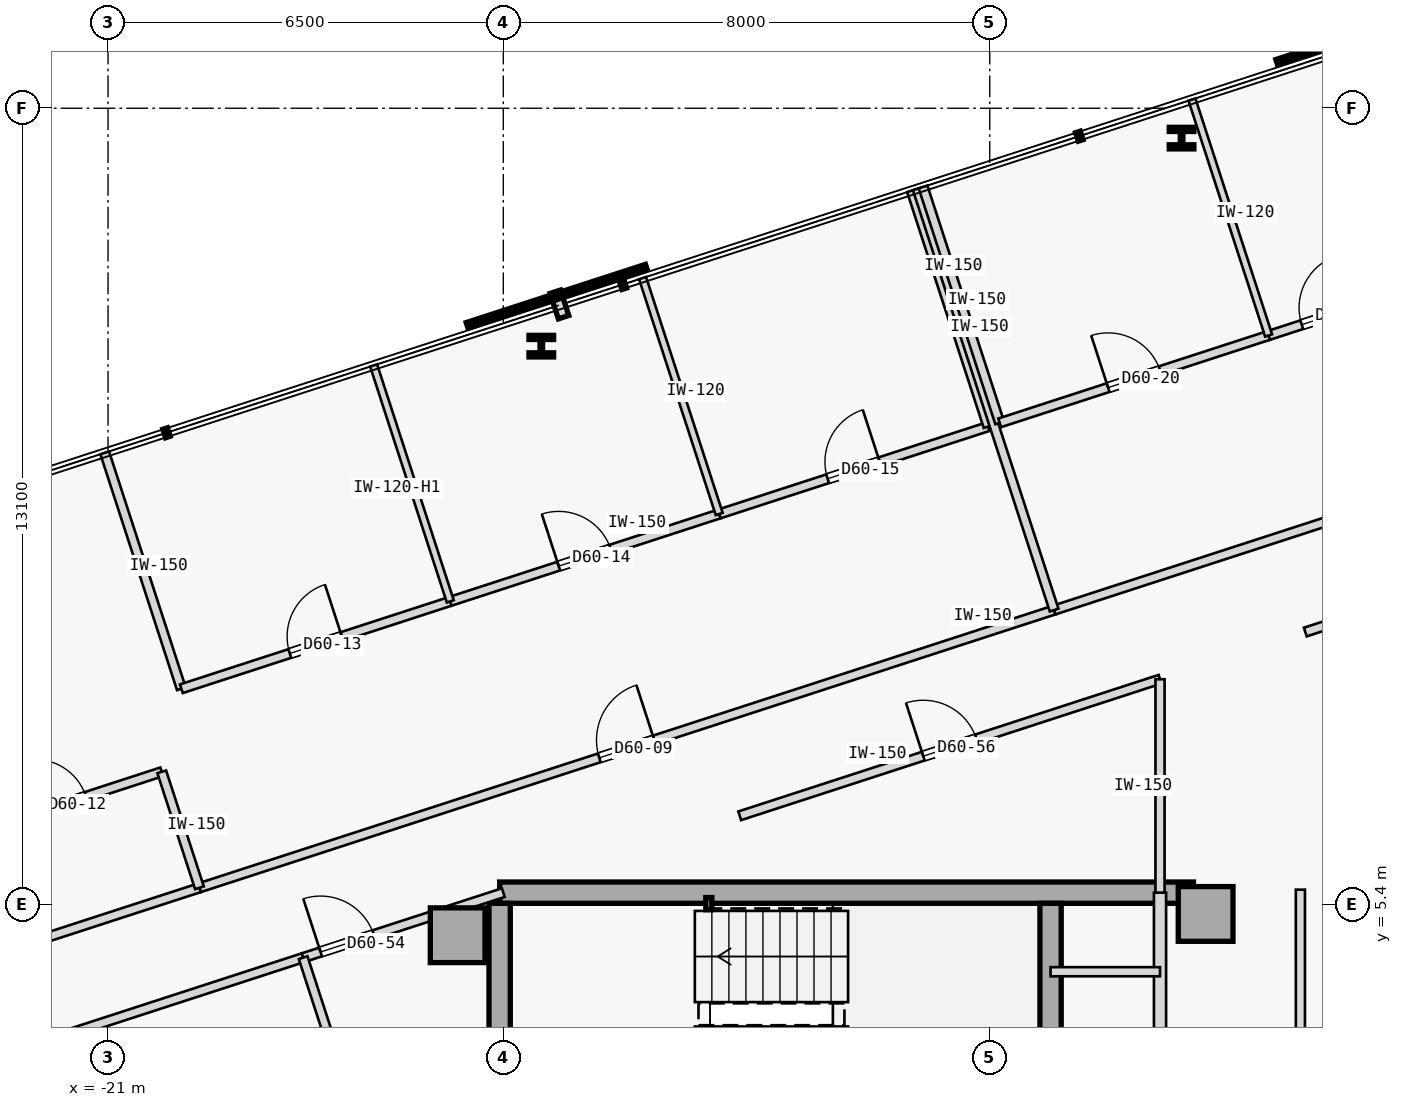
"""IFC4 building model, lengths in metres.
Left out: names, types, materials, properties, quantities, classifications, styles, units other than length and angle.
Written with IfcOpenShell. Run it as: python <this file> out.ifc"""

import sys

from ifc_helpers import new_model, si_unit, direction, frame, frame_2d, origin, origin_2d, place, context, subcontext, project, spatial, rectangle, hollow_rectangle, i_section, extrude, element, fill, save


model = new_model("IFC4")
c1 = context("Model", 3, precision=1e-05, world=origin(), true_north=direction((0.0, 1.0)))
c2 = subcontext(c1, "Body", "Model", "MODEL_VIEW")
j1 = project(units=[si_unit("LENGTHUNIT", "METRE"), si_unit("PLANEANGLEUNIT", "RADIAN")], contexts=[c1])
p1 = place(None, origin())
s1 = spatial("IfcSite", under=j1, at=p1, CompositionType="ELEMENT")
p2 = place(p1, origin())
s2 = spatial("IfcBuilding", under=s1, at=p2, CompositionType="ELEMENT")
p3 = place(p2, frame((0.0, 0.0, 227.65)))
s3 = spatial("IfcBuildingStorey", under=s2, at=p3, CompositionType="ELEMENT", Elevation=227.65)
for number, where, z_axis, x_axis in (
    (1, (-15.25, 4.9, 0.0), (0.0, 0.0, 1.0), (1.0, 0.0, 0.0)),
    (2, (-2.95, 5.25, 0.0), (0.0, 0.0, 1.0), (1.0, 0.0, 0.0)),
):
    element("IfcColumn", number, at=place(p3, frame(where, z_axis=z_axis, x_axis=x_axis)), inside=s3, PredefinedType="COLUMN", context=c2, shape_type="SweptSolid", body=[
        extrude(rectangle(XDim=0.9, YDim=0.9, at=origin_2d()), origin(), (0.0, 0.0, 1.0), 3.35),
    ])
p4 = place(p3, frame((-14.56, 5.6, 0.0), z_axis=(0.0, 0.0, 1.0), x_axis=(1.0, 0.0, 0.0)))
e3 = element("IfcWall", 3, at=p4, inside=s3, PredefinedType="SHEAR", context=c2, shape_type="SweptSolid", body=[
    extrude(rectangle(XDim=11.41, YDim=0.35, at=frame_2d((5.705, 0.0))), origin(), (0.0, 0.0, 1.0), 3.125),
])
p5 = place(p3, frame((-14.56, -5.425, 0.0), z_axis=(0.0, 0.0, 1.0), x_axis=(0.0, 1.0, 0.0)))
e4 = element("IfcWall", 4, at=p5, inside=s3, PredefinedType="SHEAR", context=c2, shape_type="SweptSolid", body=[
    extrude(rectangle(XDim=10.85, YDim=0.35, at=frame_2d((5.425, 0.0))), origin(), (0.0, 0.0, 1.0), 3.125),
])
p6 = place(p3, frame((-5.5, 2.15, 0.0), z_axis=(0.0, 0.0, 1.0), x_axis=(0.0, 1.0, 0.0)))
e5 = element("IfcWall", 5, at=p6, inside=s3, PredefinedType="SHEAR", context=c2, shape_type="SweptSolid", body=[
    extrude(rectangle(XDim=3.275, YDim=0.35, at=frame_2d((1.638, 0.0))), origin(), (0.0, 0.0, 1.0), 3.125),
])
p7 = place(p3, frame((-11.12, 5.42, 0.0), z_axis=(0.0, 0.0, 1.0), x_axis=(1.0, 0.0, 0.0)))
e6 = element("IfcColumn", 6, at=p7, inside=s3, PredefinedType="COLUMN", context=c2, shape_type="SweptSolid", body=[
    extrude(hollow_rectangle(XDim=0.1, YDim=0.2, WallThickness=0.008, at=origin_2d()), origin(), (0.0, 0.0, 1.0), 3.35),
])
for number, where, z_axis, x_axis in (
    (7, (-3.346, 18.009, 0.0), (0.0, 0.0, 1.0), (1.0, 0.0, 0.0)),
    (8, (-13.875, 14.587, 0.0), (0.0, 0.0, 1.0), (1.0, 0.0, 0.0)),
):
    element("IfcColumn", number, at=place(p3, frame(where, z_axis=z_axis, x_axis=x_axis)), inside=s3, PredefinedType="COLUMN", context=c2, shape_type="SweptSolid", body=[
        extrude(i_section(OverallWidth=0.405, OverallDepth=0.355, WebThickness=0.042, FlangeThickness=0.068, FilletRadius=0.015, at=origin_2d()), origin(), (0.0, 0.0, 1.0), 3.35),
    ])
p8 = place(p3, frame((-3.7, -1.15, 0.0), z_axis=(0.0, 0.0, 1.0), x_axis=(0.0, 1.0, 0.0)))
e9 = element("IfcWall", 9, at=p8, inside=s3, PredefinedType="STANDARD", context=c2, shape_type="SweptSolid", body=[
    extrude(rectangle(XDim=6.75, YDim=0.2, at=frame_2d((3.375, 0.0))), origin(), (0.0, 0.0, 1.0), 3.125),
])
p9 = place(p8, frame((3.6, 0.0, 0.0)))
e10 = element("IfcOpeningElement", 10, at=p9, cuts=e9, PredefinedType="OPENING", context=c2, shape_type="SweptSolid", body=[
    extrude(rectangle(XDim=0.92, YDim=2.15, at=frame_2d((0.46, 1.075))), frame((0.0, 0.11, 0.0), z_axis=(0.0, -1.0, 0.0), x_axis=(1.0, 0.0, 0.0)), (0.0, 0.0, 1.0), 0.22),
])
p10 = place(p3, frame((-5.5, 4.3, 0.0), z_axis=(0.0, 0.0, 1.0), x_axis=(1.0, 0.0, 0.0)))
e11 = element("IfcWall", 11, at=p10, inside=s3, PredefinedType="PARTITIONING", context=c2, shape_type="SweptSolid", body=[
    extrude(rectangle(XDim=1.8, YDim=0.15, at=frame_2d((0.9, 0.0))), origin(), (0.0, 0.0, 1.0), 3.125),
])
p11 = place(p3, frame((-1.391, -5.65, 0.0), z_axis=(0.0, 0.0, 1.0), x_axis=(-8.6422954e-05, 0.999999996266, 0.0)))
e12 = element("IfcWall", 12, at=p11, inside=s3, PredefinedType="PARTITIONING", context=c2, shape_type="SweptSolid", body=[
    extrude(rectangle(XDim=11.3, YDim=0.15, at=frame_2d((5.65, 0.0))), origin(), (0.0, 0.0, 1.0), 3.125),
])
p12 = place(p11, frame((5.175, 0.0, 0.0)))
e13 = element("IfcOpeningElement", 13, at=p12, cuts=e12, PredefinedType="OPENING", context=c2, shape_type="SweptSolid", body=[
    extrude(rectangle(XDim=0.95, YDim=2.15, at=frame_2d((0.475, 1.075))), frame((0.0, 0.085, 0.0), z_axis=(0.0, -1.0, 0.0), x_axis=(1.0, 0.0, 0.0)), (0.0, 0.0, 1.0), 0.17),
])
p13 = place(p3, frame((-19.497, 5.68, 0.0), z_axis=(0.0, 0.0, 1.0), x_axis=(0.95105300492, 0.309027801067, 0.0)))
e14 = element("IfcWall", 14, at=p13, inside=s3, PredefinedType="PARTITIONING", context=c2, shape_type="SweptSolid", body=[
    extrude(rectangle(XDim=14.779, YDim=0.15, at=frame_2d((7.39, 0.0))), origin(), (0.0, 0.0, 1.0), 3.125),
])
p14 = place(p13, frame((6.915, 0.0, 0.0)))
e15 = element("IfcOpeningElement", 15, at=p14, cuts=e14, PredefinedType="OPENING", context=c2, shape_type="SweptSolid", body=[
    extrude(rectangle(XDim=0.95, YDim=2.15, at=frame_2d((0.475, 1.075))), frame((0.0, 0.085, 0.0), z_axis=(0.0, -1.0, 0.0), x_axis=(1.0, 0.0, 0.0)), (0.0, 0.0, 1.0), 0.17),
])
p15 = place(p3, frame((-22.826, 4.599, 0.0), z_axis=(0.0, 0.0, 1.0), x_axis=(0.951055596592, 0.309019824916, 0.0)))
e16 = element("IfcWall", 16, at=p15, inside=s3, PredefinedType="PARTITIONING", context=c2, shape_type="SweptSolid", body=[
    extrude(rectangle(XDim=3.5, YDim=0.15, at=frame_2d((1.75, 0.0))), origin(), (0.0, 0.0, 1.0), 3.125),
])
p16 = place(p3, frame((-5.441, 10.247, 0.0), z_axis=(0.0, 0.0, 1.0), x_axis=(0.951062860421, 0.308997468483, 0.0)))
e17 = element("IfcWall", 17, at=p16, inside=s3, PredefinedType="PARTITIONING", context=c2, shape_type="SweptSolid", body=[
    extrude(rectangle(XDim=6.542, YDim=0.15, at=frame_2d((3.271, 0.0))), origin(), (0.0, 0.0, 1.0), 3.125),
])
p17 = place(p3, frame((-33.633, -0.616, 0.0), z_axis=(0.0, 0.0, 1.0), x_axis=(0.951058192995, 0.309011833974, 0.0)))
e18 = element("IfcWall", 18, at=p17, inside=s3, PredefinedType="PARTITIONING", context=c2, shape_type="SweptSolid", body=[
    extrude(rectangle(XDim=16.657, YDim=0.15, at=frame_2d((8.329, 0.0))), origin(), (0.0, 0.0, 1.0), 3.125),
])
p18 = place(p17, frame((7.868, 0.0, 0.0)))
e19 = element("IfcOpeningElement", 19, at=p18, cuts=e18, PredefinedType="OPENING", context=c2, shape_type="SweptSolid", body=[
    extrude(rectangle(XDim=0.92, YDim=2.15, at=frame_2d((0.46, 1.075))), frame((0.0, 0.085, 0.0), z_axis=(0.0, -1.0, 0.0), x_axis=(1.0, 0.0, 0.0)), (0.0, 0.0, 1.0), 0.17),
])
p19 = place(p3, frame((-17.792, 4.531, 0.0), z_axis=(0.0, 0.0, 1.0), x_axis=(0.951047546178, 0.309044600193, 0.0)))
e20 = element("IfcWall", 20, at=p19, inside=s3, PredefinedType="PARTITIONING", context=c2, shape_type="SweptSolid", body=[
    extrude(rectangle(XDim=3.461, YDim=0.15, at=frame_2d((1.73, 0.0))), origin(), (0.0, 0.0, 1.0), 3.125),
])
p20 = place(p19, frame((0.302, 0.0, 0.0)))
e21 = element("IfcOpeningElement", 21, at=p20, cuts=e20, PredefinedType="OPENING", context=c2, shape_type="SweptSolid", body=[
    extrude(rectangle(XDim=0.92, YDim=2.15, at=frame_2d((0.46, 1.075))), frame((0.0, 0.085, 0.0), z_axis=(0.0, -1.0, 0.0), x_axis=(1.0, 0.0, 0.0)), (0.0, 0.0, 1.0), 0.17),
])
p21 = place(p3, frame((-1.311, 9.886, 0.0), z_axis=(0.0, 0.0, 1.0), x_axis=(0.951068803905, 0.308979174442, 0.0)))
e22 = element("IfcWall", 22, at=p21, inside=s3, PredefinedType="PARTITIONING", context=c2, shape_type="SweptSolid", body=[
    extrude(rectangle(XDim=3.46, YDim=0.15, at=frame_2d((1.73, 0.0))), origin(), (0.0, 0.0, 1.0), 3.125),
])
p22 = place(p3, frame((-10.612, 6.864, 0.0), z_axis=(0.0, 0.0, 1.0), x_axis=(0.951060972078, 0.309003280548, 0.0)))
e23 = element("IfcWall", 23, at=p22, inside=s3, PredefinedType="PARTITIONING", context=c2, shape_type="SweptSolid", body=[
    extrude(rectangle(XDim=7.268, YDim=0.15, at=frame_2d((3.634, 0.0))), origin(), (0.0, 0.0, 1.0), 3.125),
])
p23 = place(p22, frame((3.174, 0.0, 0.0)))
e24 = element("IfcOpeningElement", 24, at=p23, cuts=e23, PredefinedType="OPENING", context=c2, shape_type="SweptSolid", body=[
    extrude(rectangle(XDim=0.92, YDim=2.15, at=frame_2d((0.46, 1.075))), frame((0.0, 0.085, 0.0), z_axis=(0.0, -1.0, 0.0), x_axis=(1.0, 0.0, 0.0)), (0.0, 0.0, 1.0), 0.17),
])
p24 = place(p3, frame((-3.7, 5.6, 0.0), z_axis=(0.0, 0.0, 1.0), x_axis=(0.000139120755, 0.999999990323, 0.0)))
e25 = element("IfcWall", 25, at=p24, inside=s3, PredefinedType="PARTITIONING", context=c2, shape_type="SweptSolid", body=[
    extrude(rectangle(XDim=3.51, YDim=0.15, at=frame_2d((1.755, 0.0))), origin(), (0.0, 0.0, 1.0), 3.125),
])
p25 = place(p3, frame((-23.445, 6.506, 0.0), z_axis=(0.0, 0.0, 1.0), x_axis=(0.951055596592, 0.309019824916, 0.0)))
e26 = element("IfcWall", 26, at=p25, inside=s3, PredefinedType="PARTITIONING", context=c2, shape_type="SweptSolid", body=[
    extrude(rectangle(XDim=3.5, YDim=0.15, at=frame_2d((1.75, 0.0))), origin(), (0.0, 0.0, 1.0), 3.125),
])
p26 = place(p25, frame((1.31, 0.0, 0.0)))
e27 = element("IfcOpeningElement", 27, at=p26, cuts=e26, PredefinedType="OPENING", context=c2, shape_type="SweptSolid", body=[
    extrude(rectangle(XDim=0.88, YDim=2.15, at=frame_2d((0.44, 1.075))), frame((0.0, 0.085, 0.0), z_axis=(0.0, -1.0, 0.0), x_axis=(1.0, 0.0, 0.0)), (0.0, 0.0, 1.0), 0.17),
])
p27 = place(p3, frame((-19.497, 5.68, 0.0), z_axis=(0.0, 0.0, 1.0), x_axis=(-0.309022749039, 0.951054646472, 0.0)))
e28 = element("IfcWall", 28, at=p27, inside=s3, PredefinedType="PARTITIONING", context=c2, shape_type="SweptSolid", body=[
    extrude(rectangle(XDim=2.005, YDim=0.15, at=frame_2d((1.002, 0.0))), origin(), (0.0, 0.0, 1.0), 3.125),
])
p28 = place(p3, frame((-19.794, 8.954, 0.0), z_axis=(0.0, 0.0, 1.0), x_axis=(-0.309018403393, 0.951056058476, 0.0)))
e29 = element("IfcWall", 29, at=p28, inside=s3, PredefinedType="PARTITIONING", context=c2, shape_type="SweptSolid", body=[
    extrude(rectangle(XDim=4.079, YDim=0.15, at=frame_2d((2.04, 0.0))), origin(), (0.0, 0.0, 1.0), 3.125),
])
p29 = place(p3, frame((-19.794, 8.954, 0.0), z_axis=(0.0, 0.0, 1.0), x_axis=(0.951065702951, 0.308988719326, 0.0)))
e30 = element("IfcWall", 30, at=p29, inside=s3, PredefinedType="PARTITIONING", context=c2, shape_type="SweptSolid", body=[
    extrude(rectangle(XDim=4.65, YDim=0.15, at=frame_2d((2.325, 0.0))), origin(), (0.0, 0.0, 1.0), 3.125),
])
p30 = place(p29, frame((1.875, 0.0, 0.0)))
e31 = element("IfcOpeningElement", 31, at=p30, cuts=e30, PredefinedType="OPENING", context=c2, shape_type="SweptSolid", body=[
    extrude(rectangle(XDim=0.9, YDim=2.15, at=frame_2d((0.45, 1.075))), frame((0.0, 0.085, 0.0), z_axis=(0.0, -1.0, 0.0), x_axis=(1.0, 0.0, 0.0)), (0.0, 0.0, 1.0), 0.17),
])
p31 = place(p3, frame((-15.372, 10.39, 0.0), z_axis=(0.0, 0.0, 1.0), x_axis=(0.951050272606, 0.309036209813, 0.0)))
e32 = element("IfcWall", 32, at=p31, inside=s3, PredefinedType="PARTITIONING", context=c2, shape_type="SweptSolid", body=[
    extrude(rectangle(XDim=4.65, YDim=0.15, at=frame_2d((2.325, 0.0))), origin(), (0.0, 0.0, 1.0), 3.125),
])
p32 = place(p31, frame((1.875, 0.0, 0.0)))
e33 = element("IfcOpeningElement", 33, at=p32, cuts=e32, PredefinedType="OPENING", context=c2, shape_type="SweptSolid", body=[
    extrude(rectangle(XDim=0.9, YDim=2.15, at=frame_2d((0.45, 1.075))), frame((0.0, 0.085, 0.0), z_axis=(0.0, -1.0, 0.0), x_axis=(1.0, 0.0, 0.0)), (0.0, 0.0, 1.0), 0.17),
])
p33 = place(p3, frame((-10.949, 11.827, 0.0), z_axis=(0.0, 0.0, 1.0), x_axis=(0.951050272606, 0.309036209813, 0.0)))
e34 = element("IfcWall", 34, at=p33, inside=s3, PredefinedType="PARTITIONING", context=c2, shape_type="SweptSolid", body=[
    extrude(rectangle(XDim=4.65, YDim=0.15, at=frame_2d((2.325, 0.0))), origin(), (0.0, 0.0, 1.0), 3.125),
])
p34 = place(p33, frame((1.875, 0.0, 0.0)))
e35 = element("IfcOpeningElement", 35, at=p34, cuts=e34, PredefinedType="OPENING", context=c2, shape_type="SweptSolid", body=[
    extrude(rectangle(XDim=0.9, YDim=2.15, at=frame_2d((0.45, 1.075))), frame((0.0, 0.085, 0.0), z_axis=(0.0, -1.0, 0.0), x_axis=(1.0, 0.0, 0.0)), (0.0, 0.0, 1.0), 0.17),
])
p35 = place(p3, frame((-6.527, 13.264, 0.0), z_axis=(0.0, 0.0, 1.0), x_axis=(-0.308964264858, 0.951073647538, 0.0)))
e36 = element("IfcWall", 36, at=p35, inside=s3, PredefinedType="PARTITIONING", context=c2, shape_type="SweptSolid", body=[
    extrude(rectangle(XDim=4.079, YDim=0.15, at=frame_2d((2.04, 0.0))), origin(), (0.0, 0.0, 1.0), 3.125),
])
p36 = place(p3, frame((-5.441, 10.247, 0.0), z_axis=(0.0, 0.0, 1.0), x_axis=(-0.309039081864, 0.951049339351, 0.0)))
e37 = element("IfcWall", 37, at=p36, inside=s3, PredefinedType="PARTITIONING", context=c2, shape_type="SweptSolid", body=[
    extrude(rectangle(XDim=7.284, YDim=0.15, at=frame_2d((3.642, 0.0))), origin(), (0.0, 0.0, 1.0), 3.125),
])
p37 = place(p3, frame((-15.372, 10.39, 0.0), z_axis=(0.0, 0.0, 1.0), x_axis=(-0.309000814064, 0.951061773445, 0.0)))
e38 = element("IfcWall", 38, at=p37, inside=s3, PredefinedType="PARTITIONING", context=c2, shape_type="SweptSolid", body=[
    extrude(rectangle(XDim=4.079, YDim=0.12, at=frame_2d((2.04, 0.0))), origin(), (0.0, 0.0, 1.0), 2.675),
])
p38 = place(p3, frame((-10.949, 11.827, 0.0), z_axis=(0.0, 0.0, 1.0), x_axis=(-0.308964264858, 0.951073647538, 0.0)))
e39 = element("IfcWall", 39, at=p38, inside=s3, PredefinedType="PARTITIONING", context=c2, shape_type="SweptSolid", body=[
    extrude(rectangle(XDim=4.079, YDim=0.12, at=frame_2d((2.04, 0.0))), origin(), (0.0, 0.0, 1.0), 3.125),
])
p39 = place(p3, frame((-6.337, 13.326, 0.0), z_axis=(0.0, 0.0, 1.0), x_axis=(-0.309018403393, 0.951056058476, 0.0)))
e40 = element("IfcWall", 40, at=p39, inside=s3, PredefinedType="PARTITIONING", context=c2, shape_type="SweptSolid", body=[
    extrude(rectangle(XDim=4.079, YDim=0.15, at=frame_2d((2.04, 0.0))), origin(), (0.0, 0.0, 1.0), 3.125),
])
p40 = place(p3, frame((-6.337, 13.326, 0.0), z_axis=(0.0, 0.0, 1.0), x_axis=(0.951050272606, 0.309036209813, 0.0)))
e41 = element("IfcWall", 41, at=p40, inside=s3, PredefinedType="PARTITIONING", context=c2, shape_type="SweptSolid", body=[
    extrude(rectangle(XDim=4.65, YDim=0.15, at=frame_2d((2.325, 0.0))), origin(), (0.0, 0.0, 1.0), 3.125),
])
p41 = place(p40, frame((1.875, 0.0, 0.0)))
e42 = element("IfcOpeningElement", 42, at=p41, cuts=e41, PredefinedType="OPENING", context=c2, shape_type="SweptSolid", body=[
    extrude(rectangle(XDim=0.9, YDim=2.15, at=frame_2d((0.45, 1.075))), frame((0.0, 0.085, 0.0), z_axis=(0.0, -1.0, 0.0), x_axis=(1.0, 0.0, 0.0)), (0.0, 0.0, 1.0), 0.17),
])
p42 = place(p3, frame((-1.914, 14.763, 0.0), z_axis=(0.0, 0.0, 1.0), x_axis=(0.951065702951, 0.308988719326, 0.0)))
e43 = element("IfcWall", 43, at=p42, inside=s3, PredefinedType="PARTITIONING", context=c2, shape_type="SweptSolid", body=[
    extrude(rectangle(XDim=4.65, YDim=0.15, at=frame_2d((2.325, 0.0))), origin(), (0.0, 0.0, 1.0), 3.125),
])
p43 = place(p42, frame((0.573, 0.0, 0.0)))
e44 = element("IfcOpeningElement", 44, at=p43, cuts=e43, PredefinedType="OPENING", context=c2, shape_type="SweptSolid", body=[
    extrude(rectangle(XDim=0.9, YDim=2.15, at=frame_2d((0.45, 1.075))), frame((0.0, 0.085, 0.0), z_axis=(0.0, -1.0, 0.0), x_axis=(1.0, 0.0, 0.0)), (0.0, 0.0, 1.0), 0.17),
])
p44 = place(p3, frame((-1.914, 14.763, 0.0), z_axis=(0.0, 0.0, 1.0), x_axis=(-0.309018403393, 0.951056058476, 0.0)))
e45 = element("IfcWall", 45, at=p44, inside=s3, PredefinedType="PARTITIONING", context=c2, shape_type="SweptSolid", body=[
    extrude(rectangle(XDim=4.079, YDim=0.12, at=frame_2d((2.04, 0.0))), origin(), (0.0, 0.0, 1.0), 3.125),
])
p45 = place(p3, frame((-16.337, 0.054, 0.0), z_axis=(0.0, 0.0, 1.0), x_axis=(-0.309029776355, 0.951052363083, 0.0)))
e46 = element("IfcWall", 46, at=p45, inside=s3, PredefinedType="PARTITIONING", context=c2, shape_type="SweptSolid", body=[
    extrude(rectangle(XDim=4.707, YDim=0.15, at=frame_2d((2.354, 0.0))), origin(), (0.0, 0.0, 1.0), 3.125),
])
p46 = place(p14, origin())
e47 = element("IfcDoor", 47, at=p46, inside=s3, OperationType="SINGLE_SWING_RIGHT", PredefinedType="DOOR", context=c2, shape_type="SweptSolid", body=[
    extrude(rectangle(XDim=0.95, YDim=2.15, at=frame_2d((0.475, 1.075))), frame((0.0, 0.025, 0.0), z_axis=(0.0, -1.0, 0.0), x_axis=(1.0, 0.0, 0.0)), (0.0, 0.0, 1.0), 0.05),
])
fill(e15, e47)
p47 = place(p26, origin())
e48 = element("IfcDoor", 48, at=p47, inside=s3, OperationType="SINGLE_SWING_LEFT", PredefinedType="DOOR", context=c2, shape_type="SweptSolid", body=[
    extrude(rectangle(XDim=0.88, YDim=2.15, at=frame_2d((0.44, 1.075))), frame((0.0, 0.025, 0.0), z_axis=(0.0, -1.0, 0.0), x_axis=(1.0, 0.0, 0.0)), (0.0, 0.0, 1.0), 0.05),
])
fill(e27, e48)
p48 = place(p30, origin())
e49 = element("IfcDoor", 49, at=p48, inside=s3, OperationType="SINGLE_SWING_RIGHT", PredefinedType="DOOR", context=c2, shape_type="SweptSolid", body=[
    extrude(rectangle(XDim=0.9, YDim=2.15, at=frame_2d((0.45, 1.075))), frame((0.0, 0.025, 0.0), z_axis=(0.0, -1.0, 0.0), x_axis=(1.0, 0.0, 0.0)), (0.0, 0.0, 1.0), 0.05),
])
fill(e31, e49)
p49 = place(p32, origin())
e50 = element("IfcDoor", 50, at=p49, inside=s3, OperationType="SINGLE_SWING_LEFT", PredefinedType="DOOR", context=c2, shape_type="SweptSolid", body=[
    extrude(rectangle(XDim=0.9, YDim=2.15, at=frame_2d((0.45, 1.075))), frame((0.0, 0.025, 0.0), z_axis=(0.0, -1.0, 0.0), x_axis=(1.0, 0.0, 0.0)), (0.0, 0.0, 1.0), 0.05),
])
fill(e33, e50)
p50 = place(p34, origin())
e51 = element("IfcDoor", 51, at=p50, inside=s3, OperationType="SINGLE_SWING_RIGHT", PredefinedType="DOOR", context=c2, shape_type="SweptSolid", body=[
    extrude(rectangle(XDim=0.9, YDim=2.15, at=frame_2d((0.45, 1.075))), frame((0.0, 0.025, 0.0), z_axis=(0.0, -1.0, 0.0), x_axis=(1.0, 0.0, 0.0)), (0.0, 0.0, 1.0), 0.05),
])
fill(e35, e51)
p51 = place(p41, origin())
e52 = element("IfcDoor", 52, at=p51, inside=s3, OperationType="SINGLE_SWING_LEFT", PredefinedType="DOOR", context=c2, shape_type="SweptSolid", body=[
    extrude(rectangle(XDim=0.9, YDim=2.15, at=frame_2d((0.45, 1.075))), frame((0.0, 0.025, 0.0), z_axis=(0.0, -1.0, 0.0), x_axis=(1.0, 0.0, 0.0)), (0.0, 0.0, 1.0), 0.05),
])
fill(e42, e52)
p52 = place(p43, origin())
e53 = element("IfcDoor", 53, at=p52, inside=s3, OperationType="SINGLE_SWING_RIGHT", PredefinedType="DOOR", context=c2, shape_type="SweptSolid", body=[
    extrude(rectangle(XDim=0.9, YDim=2.15, at=frame_2d((0.45, 1.075))), frame((0.0, 0.025, 0.0), z_axis=(0.0, -1.0, 0.0), x_axis=(1.0, 0.0, 0.0)), (0.0, 0.0, 1.0), 0.05),
])
fill(e44, e53)
p53 = place(p20, origin())
e54 = element("IfcDoor", 54, at=p53, inside=s3, OperationType="SINGLE_SWING_LEFT", PredefinedType="DOOR", context=c2, shape_type="SweptSolid", body=[
    extrude(rectangle(XDim=0.92, YDim=2.15, at=frame_2d((0.46, 1.075))), frame((0.0, 0.025, 0.0), z_axis=(0.0, -1.0, 0.0), x_axis=(1.0, 0.0, 0.0)), (0.0, 0.0, 1.0), 0.05),
])
fill(e21, e54)
p54 = place(p23, origin())
e55 = element("IfcDoor", 55, at=p54, inside=s3, OperationType="SINGLE_SWING_LEFT", PredefinedType="DOOR", context=c2, shape_type="SweptSolid", body=[
    extrude(rectangle(XDim=0.92, YDim=2.15, at=frame_2d((0.46, 1.075))), frame((0.0, 0.025, 0.0), z_axis=(0.0, -1.0, 0.0), x_axis=(1.0, 0.0, 0.0)), (0.0, 0.0, 1.0), 0.05),
])
fill(e24, e55)
save(model, sys.argv[1])
